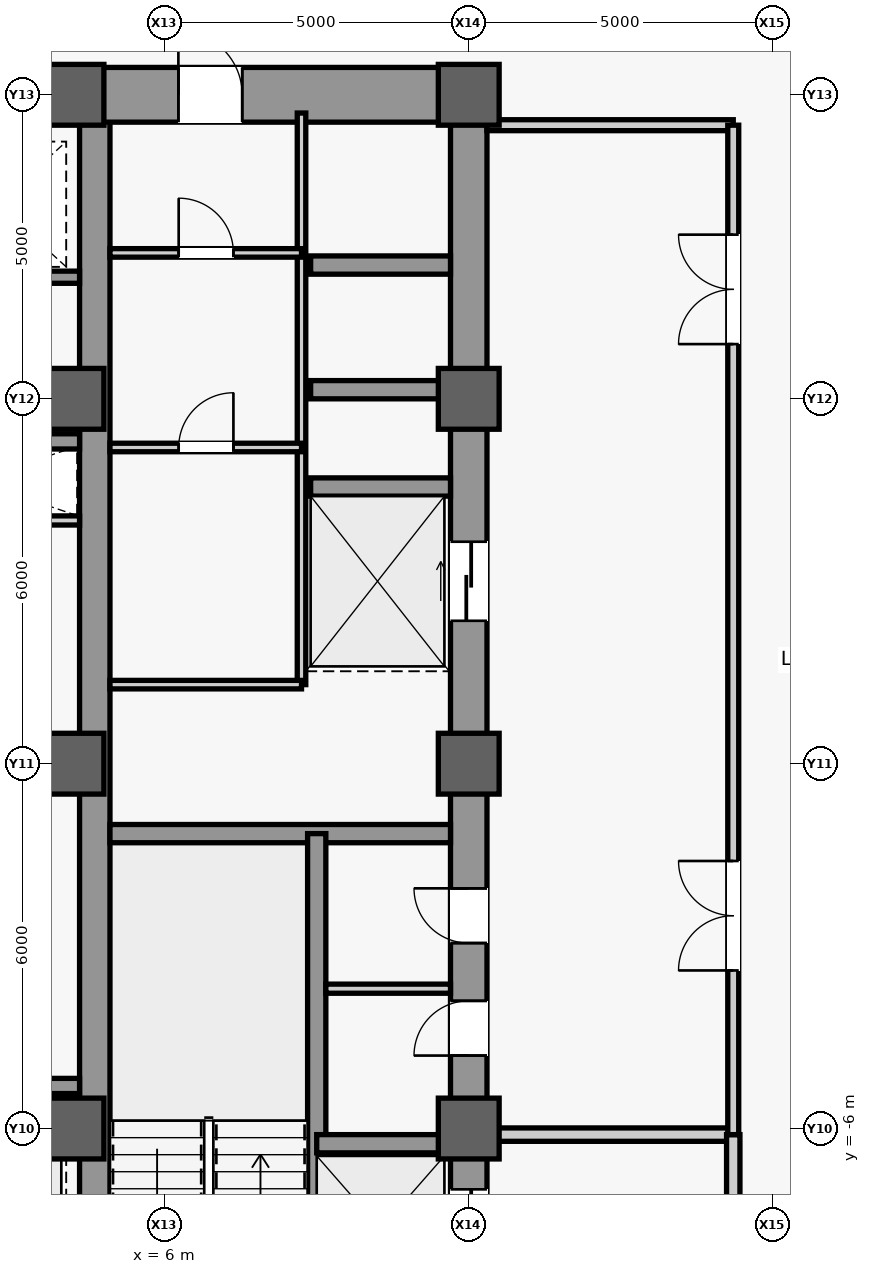
"""IFC4 building model, lengths in metres.
Left out: names, types, materials, properties, quantities, classifications, styles, units other than length and angle.
Written with IfcOpenShell. Run it as: python <this file> out.ifc"""

import sys

from ifc_helpers import new_model, si_unit, direction, frame, frame_2d, origin, origin_2d, place, context, subcontext, project, spatial, rectangle, extrude, source, transform, mapped, element, fill, save


model = new_model("IFC4")
c1 = context("Model", 3, precision=1e-05, world=origin(), true_north=direction((0.0, 1.0)))
c2 = subcontext(c1, "Body", "Model", "MODEL_VIEW")
j1 = project(units=[si_unit("LENGTHUNIT", "METRE"), si_unit("PLANEANGLEUNIT", "RADIAN")], contexts=[c1])
p1 = place(None, origin())
s1 = spatial("IfcSite", under=j1, at=p1, CompositionType="ELEMENT")
p2 = place(p1, origin())
s2 = spatial("IfcBuilding", under=s1, at=p2, CompositionType="ELEMENT")
p3 = place(p2, frame((0.0, 0.0, 87.2)))
s3 = spatial("IfcBuildingStorey", under=s2, at=p3, CompositionType="ELEMENT", Elevation=87.2)
m1 = source(origin(), c2, "Body", "SweptSolid", [
    extrude(rectangle(XDim=22.0, YDim=0.6, at=frame_2d((11.0, 0.0))), origin(), (0.0, 0.0, 1.0), 3.94),
])
p4 = place(p3, frame((11.0, -11.0, 0.0), z_axis=(0.0, 0.0, 1.0), x_axis=(0.0, 1.0, 0.0)))
e1 = element("IfcWall", 1, at=p4, inside=s3, PredefinedType="SHEAR", context=c2, shape_type="MappedRepresentation", body=[
    mapped(m1, transform((0.0, 0.0, 0.0), scale=1.0)),
])
m2 = source(origin(), c2, "Body", "SweptSolid", [
    extrude(rectangle(XDim=1.1, YDim=2.2, at=frame_2d((0.55, 1.1))), frame((0.0, 0.31, 0.0), z_axis=(0.0, -1.0, 0.0), x_axis=(1.0, 0.0, 0.0)), (0.0, 0.0, 1.0), 0.62),
])
p5 = place(p4, frame((0.8, 0.0, 0.0)))
e2 = element("IfcOpeningElement", 2, at=p5, cuts=e1, PredefinedType="OPENING", context=c2, shape_type="MappedRepresentation", body=[
    mapped(m2, transform((0.0, 0.0, 0.0), scale=1.0)),
])
m3 = source(origin(), c2, "Body", "SweptSolid", [
    extrude(rectangle(XDim=0.9, YDim=2.15, at=frame_2d((0.45, 1.075))), frame((0.0, 0.31, 0.0), z_axis=(0.0, -1.0, 0.0), x_axis=(1.0, 0.0, 0.0)), (0.0, 0.0, 1.0), 0.62),
])
p6 = place(p4, frame((6.2, 0.0, 0.0)))
e3 = element("IfcOpeningElement", 3, at=p6, cuts=e1, PredefinedType="OPENING", context=c2, shape_type="MappedRepresentation", body=[
    mapped(m3, transform((0.0, 0.0, 0.0), scale=1.0)),
])
p7 = place(p4, frame((8.05, 0.0, 0.0)))
e4 = element("IfcOpeningElement", 4, at=p7, cuts=e1, PredefinedType="OPENING", context=c2, shape_type="MappedRepresentation", body=[
    mapped(m3, transform((0.0, 0.0, 0.0), scale=1.0)),
])
m4 = source(origin(), c2, "Body", "SweptSolid", [
    extrude(rectangle(XDim=1.3, YDim=2.3, at=frame_2d((0.65, 1.15))), frame((0.0, 0.31, 0.0), z_axis=(0.0, -1.0, 0.0), x_axis=(1.0, 0.0, 0.0)), (0.0, 0.0, 1.0), 0.62),
])
p8 = place(p4, frame((2.7, 0.0, 0.0)))
e5 = element("IfcOpeningElement", 5, at=p8, cuts=e1, PredefinedType="OPENING", context=c2, shape_type="MappedRepresentation", body=[
    mapped(m4, transform((0.0, 0.0, 0.0), scale=1.0)),
])
p9 = place(p4, frame((13.35, 0.0, 0.0)))
e6 = element("IfcOpeningElement", 6, at=p9, cuts=e1, PredefinedType="OPENING", context=c2, shape_type="MappedRepresentation", body=[
    mapped(m4, transform((0.0, 0.0, 0.0), scale=1.0)),
])
m5 = source(origin(), c2, "Body", "SweptSolid", [
    extrude(rectangle(XDim=21.4, YDim=0.5, at=frame_2d((10.7, 0.0))), origin(), (0.0, 0.0, 1.0), 3.94),
])
p10 = place(p3, frame((4.85, -10.7, 0.0), z_axis=(0.0, 0.0, 1.0), x_axis=(0.0, 1.0, 0.0)))
e7 = element("IfcWall", 7, at=p10, inside=s3, PredefinedType="SHEAR", context=c2, shape_type="MappedRepresentation", body=[
    mapped(m5, transform((0.0, 0.0, 0.0), scale=1.0)),
])
m6 = source(origin(), c2, "Body", "SweptSolid", [
    extrude(rectangle(XDim=5.85, YDim=0.9, at=frame_2d((2.925, 0.0))), origin(), (0.0, 0.0, 1.0), 3.94),
])
p11 = place(p3, frame((4.85, 11.0, 0.0), z_axis=(0.0, 0.0, 1.0), x_axis=(1.0, 0.0, 0.0)))
e8 = element("IfcWall", 8, at=p11, inside=s3, PredefinedType="SHEAR", context=c2, shape_type="MappedRepresentation", body=[
    mapped(m6, transform((0.0, 0.0, 0.0), scale=1.0)),
])
m7 = source(origin(), c2, "Body", "SweptSolid", [
    extrude(rectangle(XDim=1.05, YDim=2.2, at=frame_2d((0.525, 1.1))), frame((0.0, 0.46, 0.0), z_axis=(0.0, -1.0, 0.0), x_axis=(1.0, 0.0, 0.0)), (0.0, 0.0, 1.0), 0.92),
])
p12 = place(p11, frame((1.375, 0.0, 0.0)))
e9 = element("IfcOpeningElement", 9, at=p12, cuts=e8, PredefinedType="OPENING", context=c2, shape_type="MappedRepresentation", body=[
    mapped(m7, transform((0.0, 0.0, 0.0), scale=1.0)),
])
m8 = source(origin(), c2, "Body", "SweptSolid", [
    extrude(rectangle(XDim=5.6, YDim=0.3, at=frame_2d((2.8, 0.0))), origin(), (0.0, 0.0, 1.0), 3.94),
])
p13 = place(p3, frame((5.1, -1.15, 0.0), z_axis=(0.0, 0.0, 1.0), x_axis=(1.0, 0.0, 0.0)))
e10 = element("IfcWall", 10, at=p13, inside=s3, PredefinedType="SHEAR", context=c2, shape_type="MappedRepresentation", body=[
    mapped(m8, transform((0.0, 0.0, 0.0), scale=1.0)),
])
m9 = source(origin(), c2, "Body", "SweptSolid", [
    extrude(rectangle(XDim=9.2, YDim=0.5, at=frame_2d((4.6, 0.0))), origin(), (0.0, 0.0, 1.0), 3.94),
])
p14 = place(p3, frame((-4.6, 11.0, 0.0), z_axis=(0.0, 0.0, 1.0), x_axis=(1.0, 0.0, 0.0)))
e11 = element("IfcWall", 11, at=p14, inside=s3, PredefinedType="SHEAR", context=c2, shape_type="MappedRepresentation", body=[
    mapped(m9, transform((0.0, 0.0, 0.0), scale=1.0)),
])
m10 = source(origin(), c2, "Body", "SweptSolid", [
    extrude(rectangle(XDim=1.8, YDim=2.25, at=frame_2d((0.9, 1.125))), frame((0.0, 0.26, 0.0), z_axis=(0.0, -1.0, 0.0), x_axis=(1.0, 0.0, 0.0)), (0.0, 0.0, 1.0), 0.52),
])
p15 = place(p14, frame((3.7, 0.0, 0.0)))
e12 = element("IfcOpeningElement", 12, at=p15, cuts=e11, PredefinedType="OPENING", context=c2, shape_type="MappedRepresentation", body=[
    mapped(m10, transform((0.0, 0.0, 0.0), scale=1.0)),
])
m11 = source(origin(), c2, "Body", "SweptSolid", [
    extrude(rectangle(XDim=1.0, YDim=1.0, at=origin_2d()), origin(), (0.0, 0.0, 1.0), 4.2),
])
for number, where, z_axis, x_axis in (
    (13, (4.5, -6.0, 0.0), (0.0, 0.0, 1.0), (1.0, 0.0, 0.0)),
    (14, (4.5, 0.0, 0.0), (0.0, 0.0, 1.0), (1.0, 0.0, 0.0)),
    (15, (4.5, 6.0, 0.0), (0.0, 0.0, 1.0), (1.0, 0.0, 0.0)),
    (16, (4.5, 11.0, 0.0), (0.0, 0.0, 1.0), (1.0, 0.0, 0.0)),
    (17, (11.0, -6.0, 0.0), (0.0, 0.0, 1.0), (1.0, 0.0, 0.0)),
    (18, (11.0, 0.0, 0.0), (0.0, 0.0, 1.0), (1.0, 0.0, 0.0)),
    (19, (11.0, 6.0, 0.0), (0.0, 0.0, 1.0), (1.0, 0.0, 0.0)),
    (20, (11.0, 11.0, 0.0), (0.0, 0.0, 1.0), (1.0, 0.0, 0.0)),
):
    element("IfcColumn", number, at=place(p3, frame(where, z_axis=z_axis, x_axis=x_axis)), inside=s3, PredefinedType="COLUMN", context=c2, shape_type="MappedRepresentation", body=[
        mapped(m11, transform((0.0, 0.0, 0.0), scale=1.0)),
    ])
m12 = source(origin(), c2, "Body", "SweptSolid", [
    extrude(rectangle(XDim=7.8, YDim=0.3, at=frame_2d((3.9, 0.0))), origin(), (0.0, 0.0, 1.0), 3.94),
])
p16 = place(p3, frame((8.5, -8.95, 0.0), z_axis=(0.0, 0.0, 1.0), x_axis=(0.0, 1.0, 0.0)))
e21 = element("IfcWall", 21, at=p16, inside=s3, PredefinedType="SHEAR", context=c2, shape_type="MappedRepresentation", body=[
    mapped(m12, transform((0.0, 0.0, 0.0), scale=1.0)),
])
m13 = source(origin(), c2, "Body", "SweptSolid", [
    extrude(rectangle(XDim=2.2, YDim=0.3, at=frame_2d((1.1, 0.0))), origin(), (0.0, 0.0, 1.0), 3.94),
])
p17 = place(p3, frame((8.5, -6.25, 0.0), z_axis=(0.0, 0.0, 1.0), x_axis=(1.0, 0.0, 0.0)))
e22 = element("IfcWall", 22, at=p17, inside=s3, PredefinedType="SHEAR", context=c2, shape_type="MappedRepresentation", body=[
    mapped(m13, transform((0.0, 0.0, 0.0), scale=1.0)),
])
m14 = source(origin(), c2, "Body", "SweptSolid", [
    extrude(rectangle(XDim=2.3, YDim=0.3, at=frame_2d((1.15, 0.0))), origin(), (0.0, 0.0, 1.0), 3.94),
])
for number, where, z_axis, x_axis in (
    (23, (8.4, 4.55, 0.0), (0.0, 0.0, 1.0), (1.0, 0.0, 0.0)),
    (24, (8.4, 6.15, 0.0), (0.0, 0.0, 1.0), (1.0, 0.0, 0.0)),
    (25, (8.4, 8.2, 0.0), (0.0, 0.0, 1.0), (1.0, 0.0, 0.0)),
):
    element("IfcWall", number, at=place(p3, frame(where, z_axis=z_axis, x_axis=x_axis)), inside=s3, PredefinedType="SHEAR", context=c2, shape_type="MappedRepresentation", body=[
        mapped(m14, transform((0.0, 0.0, 0.0), scale=1.0)),
    ])
m15 = source(origin(), c2, "Body", "SweptSolid", [
    extrude(rectangle(XDim=2.05, YDim=0.15, at=frame_2d((1.025, 0.0))), origin(), (0.0, 0.0, 1.0), 3.94),
])
p18 = place(p3, frame((8.65, -3.7, 0.0), z_axis=(0.0, 0.0, 1.0), x_axis=(1.0, 0.0, 0.0)))
e26 = element("IfcWall", 26, at=p18, inside=s3, PredefinedType="PARTITIONING", context=c2, shape_type="MappedRepresentation", body=[
    mapped(m15, transform((0.0, 0.0, 0.0), scale=1.0)),
])
m16 = source(origin(), c2, "Body", "SweptSolid", [
    extrude(rectangle(XDim=9.4, YDim=0.14, at=frame_2d((4.7, 0.0))), origin(), (0.0, 0.0, 1.0), 3.94),
])
p19 = place(p3, frame((8.25, 1.3, 0.0), z_axis=(0.0, 0.0, 1.0), x_axis=(0.0, 1.0, 0.0)))
e27 = element("IfcWall", 27, at=p19, inside=s3, PredefinedType="PARTITIONING", context=c2, shape_type="MappedRepresentation", body=[
    mapped(m16, transform((0.0, 0.0, 0.0), scale=1.0)),
])
m17 = source(origin(), c2, "Body", "SweptSolid", [
    extrude(rectangle(XDim=3.15, YDim=0.14, at=frame_2d((1.575, 0.0))), origin(), (0.0, 0.0, 1.0), 3.94),
])
p20 = place(p3, frame((5.1, 1.3, 0.0), z_axis=(0.0, 0.0, 1.0), x_axis=(1.0, 0.0, 0.0)))
e28 = element("IfcWall", 28, at=p20, inside=s3, PredefinedType="PARTITIONING", context=c2, shape_type="MappedRepresentation", body=[
    mapped(m17, transform((0.0, 0.0, 0.0), scale=1.0)),
])
p21 = place(p3, frame((5.1, 8.4, 0.0), z_axis=(0.0, 0.0, 1.0), x_axis=(1.0, 0.0, 0.0)))
e29 = element("IfcWall", 29, at=p21, inside=s3, PredefinedType="PARTITIONING", context=c2, shape_type="MappedRepresentation", body=[
    mapped(m17, transform((0.0, 0.0, 0.0), scale=1.0)),
])
m18 = source(origin(), c2, "Body", "SweptSolid", [
    extrude(rectangle(XDim=0.9, YDim=2.15, at=frame_2d((0.45, 1.075))), frame((0.0, 0.08, 0.0), z_axis=(0.0, -1.0, 0.0), x_axis=(1.0, 0.0, 0.0)), (0.0, 0.0, 1.0), 0.16),
])
p22 = place(p21, frame((1.13, 0.0, 0.0)))
e30 = element("IfcOpeningElement", 30, at=p22, cuts=e29, PredefinedType="OPENING", context=c2, shape_type="MappedRepresentation", body=[
    mapped(m18, transform((0.0, 0.0, 0.0), scale=1.0)),
])
p23 = place(p3, frame((5.1, 5.2, 0.0), z_axis=(0.0, 0.0, 1.0), x_axis=(1.0, 0.0, 0.0)))
e31 = element("IfcWall", 31, at=p23, inside=s3, PredefinedType="PARTITIONING", context=c2, shape_type="MappedRepresentation", body=[
    mapped(m17, transform((0.0, 0.0, 0.0), scale=1.0)),
])
p24 = place(p23, frame((1.13, 0.0, 0.0)))
e32 = element("IfcOpeningElement", 32, at=p24, cuts=e31, PredefinedType="OPENING", context=c2, shape_type="MappedRepresentation", body=[
    mapped(m18, transform((0.0, 0.0, 0.0), scale=1.0)),
])
m19 = source(origin(), c2, "Body", "SweptSolid", [
    extrude(rectangle(XDim=4.05, YDim=0.22, at=frame_2d((2.025, 0.0))), origin(), (0.0, 0.0, 1.0), 2.54),
])
p25 = place(p3, frame((11.3, -6.1, 0.0), z_axis=(0.0, 0.0, 1.0), x_axis=(1.0, 0.0, 0.0)))
e33 = element("IfcWall", 33, at=p25, inside=s3, PredefinedType="PARTITIONING", context=c2, shape_type="MappedRepresentation", body=[
    mapped(m19, transform((0.0, 0.0, 0.0), scale=1.0)),
])
m20 = source(origin(), c2, "Body", "SweptSolid", [
    extrude(rectangle(XDim=4.4, YDim=0.22, at=frame_2d((2.2, 0.0))), origin(), (0.0, 0.0, 1.0), 3.94),
])
p26 = place(p3, frame((15.35, -10.5, 0.0), z_axis=(0.0, 0.0, 1.0), x_axis=(0.0, 1.0, 0.0)))
e34 = element("IfcWall", 34, at=p26, inside=s3, PredefinedType="PARTITIONING", context=c2, shape_type="MappedRepresentation", body=[
    mapped(m20, transform((0.0, 0.0, 0.0), scale=1.0)),
])
m21 = source(origin(), c2, "Body", "SweptSolid", [
    extrude(rectangle(XDim=1.2, YDim=2.2, at=frame_2d((0.6, 1.1))), frame((0.0, 0.12, 0.0), z_axis=(0.0, -1.0, 0.0), x_axis=(1.0, 0.0, 0.0)), (0.0, 0.0, 1.0), 0.24),
])
p27 = place(p26, frame((1.6, 0.0, 0.0)))
e35 = element("IfcOpeningElement", 35, at=p27, cuts=e34, PredefinedType="OPENING", context=c2, shape_type="MappedRepresentation", body=[
    mapped(m21, transform((0.0, 0.0, 0.0), scale=1.0)),
])
m22 = source(origin(), c2, "Body", "SweptSolid", [
    extrude(rectangle(XDim=4.05, YDim=0.18, at=frame_2d((2.025, 0.0))), origin(), (0.0, 0.0, 1.0), 3.94),
])
p28 = place(p3, frame((11.3, 10.5, 0.0), z_axis=(0.0, 0.0, 1.0), x_axis=(1.0, 0.0, 0.0)))
e36 = element("IfcWall", 36, at=p28, inside=s3, PredefinedType="PARTITIONING", context=c2, shape_type="MappedRepresentation", body=[
    mapped(m22, transform((0.0, 0.0, 0.0), scale=1.0)),
])
m23 = source(origin(), c2, "Body", "SweptSolid", [
    extrude(rectangle(XDim=16.6, YDim=0.18, at=frame_2d((8.3, 0.0))), origin(), (0.0, 0.0, 1.0), 3.94),
])
p29 = place(p3, frame((15.35, -6.1, 0.0), z_axis=(0.0, 0.0, 1.0), x_axis=(0.0, 1.0, 0.0)))
e37 = element("IfcWall", 37, at=p29, inside=s3, PredefinedType="PARTITIONING", context=c2, shape_type="MappedRepresentation", body=[
    mapped(m23, transform((0.0, 0.0, 0.0), scale=1.0)),
])
m24 = source(origin(), c2, "Body", "SweptSolid", [
    extrude(rectangle(XDim=1.8, YDim=2.25, at=frame_2d((0.9, 1.125))), frame((0.0, 0.1, 0.0), z_axis=(0.0, -1.0, 0.0), x_axis=(1.0, 0.0, 0.0)), (0.0, 0.0, 1.0), 0.2),
])
p30 = place(p29, frame((2.7, 0.0, 0.0)))
e38 = element("IfcOpeningElement", 38, at=p30, cuts=e37, PredefinedType="OPENING", context=c2, shape_type="MappedRepresentation", body=[
    mapped(m24, transform((0.0, 0.0, 0.0), scale=1.0)),
])
p31 = place(p29, frame((13.0, 0.0, 0.0)))
e39 = element("IfcOpeningElement", 39, at=p31, cuts=e37, PredefinedType="OPENING", context=c2, shape_type="MappedRepresentation", body=[
    mapped(m24, transform((0.0, 0.0, 0.0), scale=1.0)),
])
m25 = source(origin(), c2, "Body", "SweptSolid", [
    extrude(rectangle(XDim=3.45, YDim=0.15, at=frame_2d((1.725, 0.0))), origin(), (0.0, 0.0, 1.0), 3.94),
])
p32 = place(p3, frame((1.15, 4.0, 0.0), z_axis=(0.0, 0.0, 1.0), x_axis=(1.0, 0.0, 0.0)))
e40 = element("IfcWall", 40, at=p32, inside=s3, PredefinedType="PARTITIONING", context=c2, shape_type="MappedRepresentation", body=[
    mapped(m25, transform((0.0, 0.0, 0.0), scale=1.0)),
])
m26 = source(origin(), c2, "Body", "SweptSolid", [
    extrude(rectangle(XDim=9.2, YDim=0.25, at=frame_2d((4.6, 0.0))), origin(), (0.0, 0.0, 1.0), 3.94),
])
p33 = place(p3, frame((-4.6, -5.3, 0.0), z_axis=(0.0, 0.0, 1.0), x_axis=(1.0, 0.0, 0.0)))
e41 = element("IfcWall", 41, at=p33, inside=s3, PredefinedType="SHEAR", context=c2, shape_type="MappedRepresentation", body=[
    mapped(m26, transform((0.0, 0.0, 0.0), scale=1.0)),
])
m27 = source(origin(), c2, "Body", "SweptSolid", [
    extrude(rectangle(XDim=1.05, YDim=2.2, at=frame_2d((0.525, 1.1))), frame((0.0, 0.135, 0.0), z_axis=(0.0, -1.0, 0.0), x_axis=(1.0, 0.0, 0.0)), (0.0, 0.0, 1.0), 0.27),
])
p34 = place(p33, frame((4.075, 0.0, 0.0)))
e42 = element("IfcOpeningElement", 42, at=p34, cuts=e41, PredefinedType="OPENING", context=c2, shape_type="MappedRepresentation", body=[
    mapped(m27, transform((0.0, 0.0, 0.0), scale=1.0)),
])
m28 = source(origin(), c2, "Body", "SweptSolid", [
    extrude(rectangle(XDim=2.45, YDim=0.2, at=frame_2d((1.225, 0.0))), origin(), (0.0, 0.0, 1.0), 3.94),
])
p35 = place(p3, frame((2.15, 8.0, 0.0), z_axis=(0.0, 0.0, 1.0), x_axis=(1.0, 0.0, 0.0)))
e43 = element("IfcWall", 43, at=p35, inside=s3, PredefinedType="SHEAR", context=c2, shape_type="MappedRepresentation", body=[
    mapped(m28, transform((0.0, 0.0, 0.0), scale=1.0)),
])
p36 = place(p3, frame((-4.6, 5.3, 0.0), z_axis=(0.0, 0.0, 1.0), x_axis=(1.0, 0.0, 0.0)))
e44 = element("IfcWall", 44, at=p36, inside=s3, PredefinedType="SHEAR", context=c2, shape_type="MappedRepresentation", body=[
    mapped(m26, transform((0.0, 0.0, 0.0), scale=1.0)),
])
p37 = place(p36, frame((4.075, 0.0, 0.0)))
e45 = element("IfcOpeningElement", 45, at=p37, cuts=e44, PredefinedType="OPENING", context=c2, shape_type="MappedRepresentation", body=[
    mapped(m27, transform((0.0, 0.0, 0.0), scale=1.0)),
])
m29 = source(origin(), c2, "Body", "SweptSolid", [
    extrude(rectangle(XDim=0.9, YDim=2.15, at=frame_2d((0.45, 1.075))), frame((0.0, 0.025, 0.0), z_axis=(0.0, -1.0, 0.0), x_axis=(1.0, 0.0, 0.0)), (0.0, 0.0, 1.0), 0.05),
])
p38 = place(p6, origin())
e46 = element("IfcDoor", 46, at=p38, inside=s3, OperationType="SINGLE_SWING_LEFT", PredefinedType="DOOR", context=c2, shape_type="MappedRepresentation", body=[
    mapped(m29, transform((0.0, 0.0, 0.0), scale=1.0)),
])
fill(e3, e46)
p39 = place(p7, origin())
e47 = element("IfcDoor", 47, at=p39, inside=s3, OperationType="SINGLE_SWING_RIGHT", PredefinedType="DOOR", context=c2, shape_type="MappedRepresentation", body=[
    mapped(m29, transform((0.0, 0.0, 0.0), scale=1.0)),
])
fill(e4, e47)
m30 = source(origin(), c2, "Body", "SweptSolid", [
    extrude(rectangle(XDim=1.05, YDim=2.2, at=frame_2d((0.525, 1.1))), frame((0.0, 0.025, 0.0), z_axis=(0.0, -1.0, 0.0), x_axis=(1.0, 0.0, 0.0)), (0.0, 0.0, 1.0), 0.05),
])
p40 = place(p12, origin())
e48 = element("IfcDoor", 48, at=p40, inside=s3, OperationType="SINGLE_SWING_LEFT", PredefinedType="DOOR", context=c2, shape_type="MappedRepresentation", body=[
    mapped(m30, transform((0.0, 0.0, 0.0), scale=1.0)),
])
fill(e9, e48)
p41 = place(p22, origin())
e49 = element("IfcDoor", 49, at=p41, inside=s3, OperationType="SINGLE_SWING_LEFT", PredefinedType="DOOR", context=c2, shape_type="MappedRepresentation", body=[
    mapped(m29, transform((0.0, 0.0, 0.0), scale=1.0)),
])
fill(e30, e49)
p42 = place(p24, origin())
e50 = element("IfcDoor", 50, at=p42, inside=s3, OperationType="SINGLE_SWING_RIGHT", PredefinedType="DOOR", context=c2, shape_type="MappedRepresentation", body=[
    mapped(m29, transform((0.0, 0.0, 0.0), scale=1.0)),
])
fill(e32, e50)
m31 = source(origin(), c2, "Body", "SweptSolid", [
    extrude(rectangle(XDim=1.8, YDim=2.25, at=frame_2d((0.9, 1.125))), frame((0.0, 0.025, 0.0), z_axis=(0.0, -1.0, 0.0), x_axis=(1.0, 0.0, 0.0)), (0.0, 0.0, 1.0), 0.05),
])
p43 = place(p30, origin())
e51 = element("IfcDoor", 51, at=p43, inside=s3, OperationType="SINGLE_SWING_RIGHT", PredefinedType="DOOR", context=c2, shape_type="MappedRepresentation", body=[
    mapped(m31, transform((0.0, 0.0, 0.0), scale=1.0)),
])
fill(e38, e51)
p44 = place(p31, origin())
e52 = element("IfcDoor", 52, at=p44, inside=s3, OperationType="SINGLE_SWING_LEFT", PredefinedType="DOOR", context=c2, shape_type="MappedRepresentation", body=[
    mapped(m31, transform((0.0, 0.0, 0.0), scale=1.0)),
])
fill(e39, e52)
m32 = source(origin(), c2, "Body", "SweptSolid", [
    extrude(rectangle(XDim=1.3, YDim=2.3, at=frame_2d((0.65, 1.15))), frame((0.0, 0.025, 0.0), z_axis=(0.0, -1.0, 0.0), x_axis=(1.0, 0.0, 0.0)), (0.0, 0.0, 1.0), 0.05),
])
p45 = place(p8, origin())
e53 = element("IfcDoor", 53, at=p45, inside=s3, OperationType="SLIDING_TO_LEFT", PredefinedType="DOOR", context=c2, shape_type="MappedRepresentation", body=[
    mapped(m32, transform((0.0, 0.0, 0.0), scale=1.0)),
])
fill(e5, e53)
p46 = place(p9, origin())
e54 = element("IfcDoor", 54, at=p46, inside=s3, OperationType="SLIDING_TO_LEFT", PredefinedType="DOOR", context=c2, shape_type="MappedRepresentation", body=[
    mapped(m32, transform((0.0, 0.0, 0.0), scale=1.0)),
])
fill(e6, e54)
save(model, sys.argv[1])
